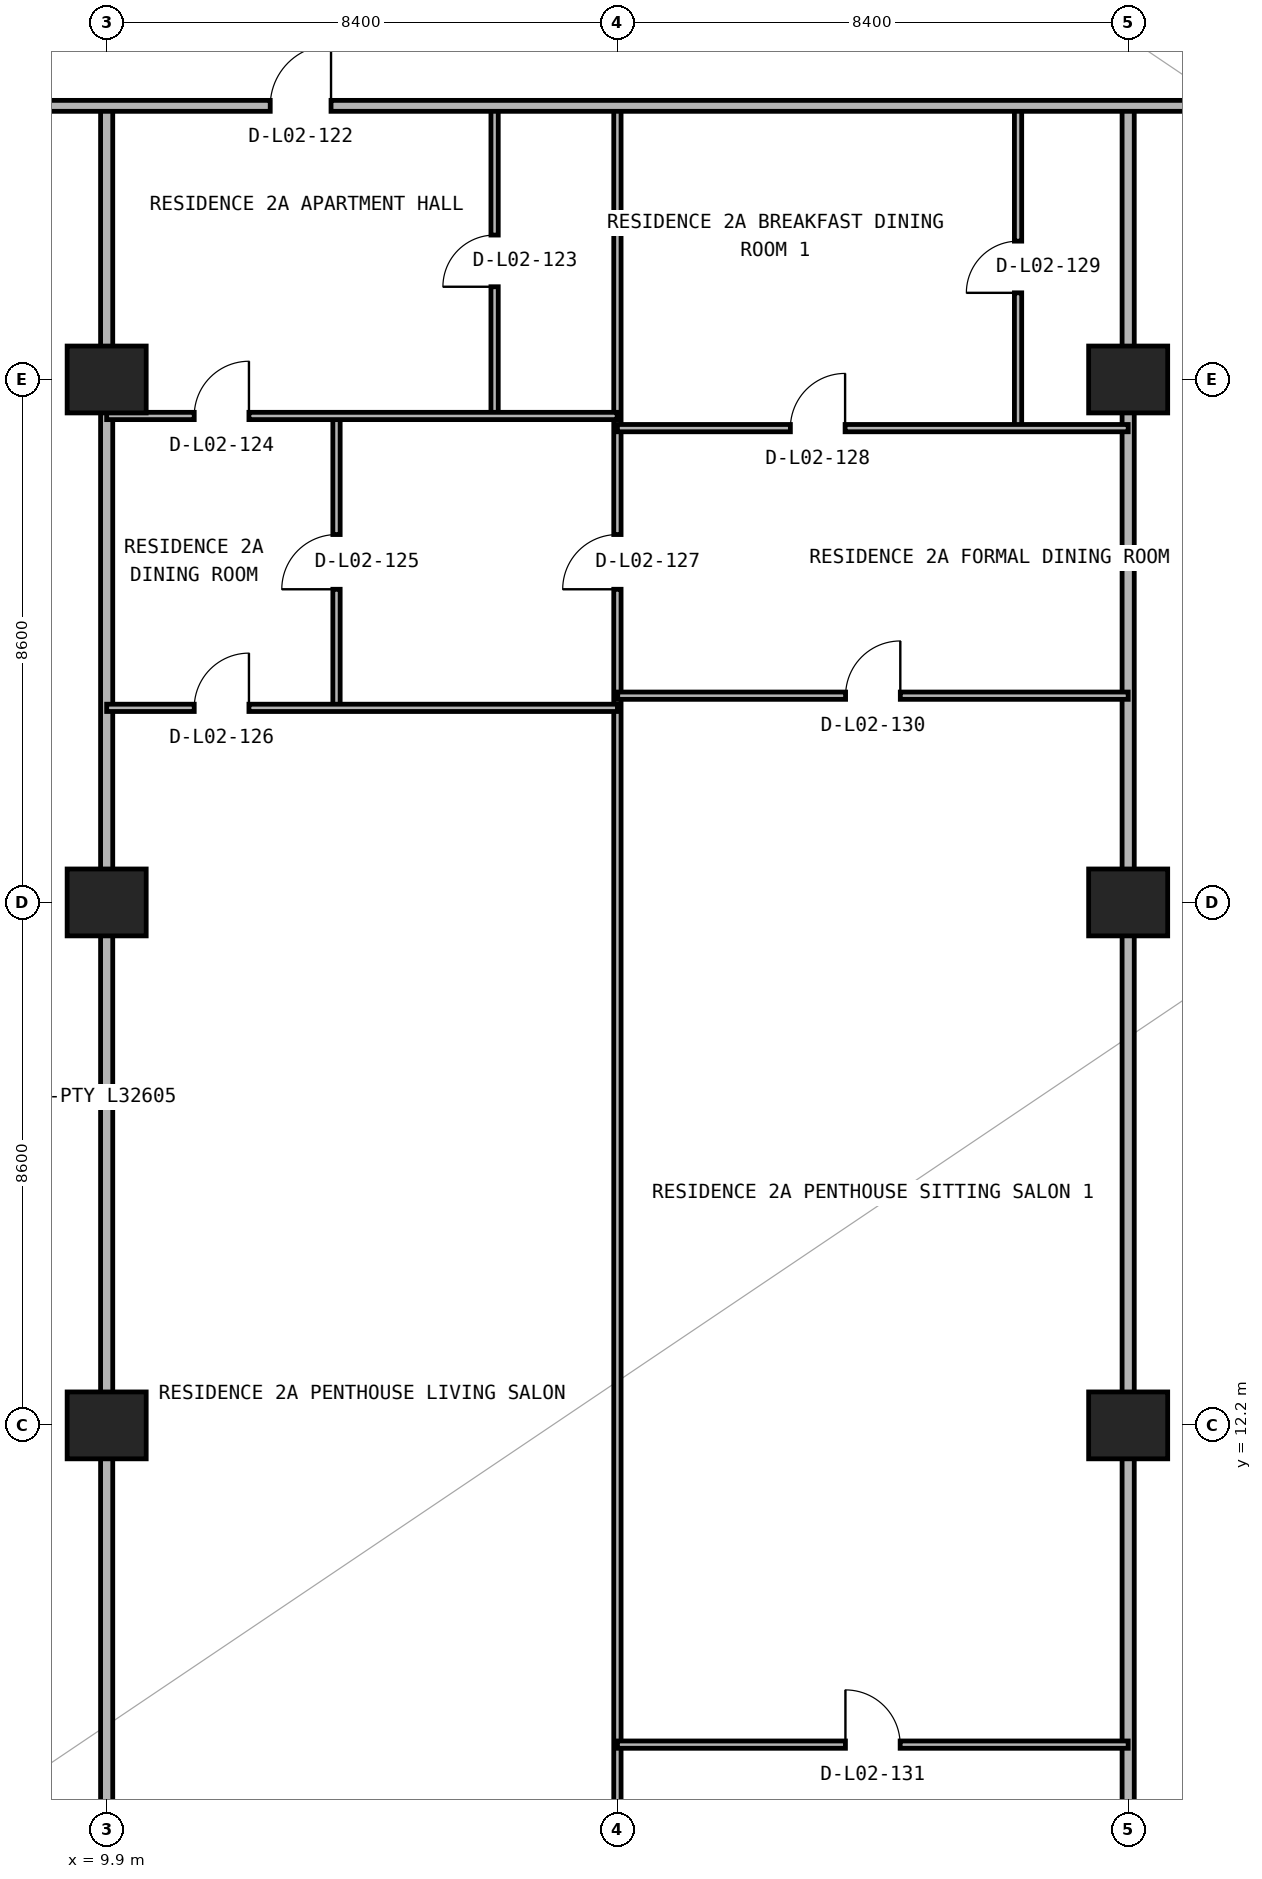
"""IFC4 building model, lengths in metres.
Left out: names, types, materials, properties, quantities, classifications, styles, units other than length and angle.
Written with IfcOpenShell. Run it as: python <this file> out.ifc"""

import sys

from ifc_helpers import new_model, si_unit, direction, frame, frame_2d, origin, origin_2d, place, context, subcontext, project, spatial, rectangle, extrude, element, fill, save


model = new_model("IFC4")
c1 = context("Model", 3, precision=1e-05, world=origin(), true_north=direction((0.0, 1.0)))
c2 = subcontext(c1, "Body", "Model", "MODEL_VIEW")
j1 = project(units=[si_unit("LENGTHUNIT", "METRE"), si_unit("PLANEANGLEUNIT", "RADIAN")], contexts=[c1])
p1 = place(None, origin())
s1 = spatial("IfcSite", under=j1, at=p1, CompositionType="ELEMENT")
p2 = place(p1, origin())
s2 = spatial("IfcBuilding", under=s1, at=p2, CompositionType="ELEMENT")
p3 = place(p2, frame((0.0, 0.0, 10.2)))
s3 = spatial("IfcBuildingStorey", under=s2, at=p3, CompositionType="ELEMENT", Elevation=10.2)
for number, where, z_axis, x_axis in (
    (1, (9.9, 12.2, 0.0), (0.0, 0.0, 1.0), (1.0, 0.0, 0.0)),
    (2, (26.7, 12.2, 0.0), (0.0, 0.0, 1.0), (1.0, 0.0, 0.0)),
    (3, (9.9, 20.8, 0.0), (0.0, 0.0, 1.0), (1.0, 0.0, 0.0)),
    (4, (26.7, 20.8, 0.0), (0.0, 0.0, 1.0), (1.0, 0.0, 0.0)),
    (5, (9.9, 29.4, 0.0), (0.0, 0.0, 1.0), (1.0, 0.0, 0.0)),
    (6, (26.7, 29.4, 0.0), (0.0, 0.0, 1.0), (1.0, 0.0, 0.0)),
):
    element("IfcColumn", number, at=place(p3, frame(where, z_axis=z_axis, x_axis=x_axis)), inside=s3, PredefinedType="COLUMN", context=c2, shape_type="SweptSolid", body=[
        extrude(rectangle(XDim=1.3, YDim=1.1, at=origin_2d()), origin(), (0.0, 0.0, 1.0), 4.5),
    ])
p4 = place(p3, frame((9.9, 1.295, 0.0), z_axis=(0.0, 0.0, 1.0), x_axis=(0.0, 1.0, 0.0)))
e7 = element("IfcWall", 7, at=p4, inside=s3, PredefinedType="PARTITIONING", context=c2, shape_type="SweptSolid", body=[
    extrude(rectangle(XDim=32.605, YDim=0.2, at=frame_2d((16.302, 0.0))), origin(), (0.0, 0.0, 1.0), 3.464),
])
p5 = place(p3, frame((13.68, 24.0, 0.0), z_axis=(0.0, 0.0, 1.0), x_axis=(0.0, 1.0, 0.0)))
e8 = element("IfcWall", 8, at=p5, inside=s3, PredefinedType="PARTITIONING", context=c2, shape_type="SweptSolid", body=[
    extrude(rectangle(XDim=4.8, YDim=0.12, at=frame_2d((2.4, 0.0))), origin(), (0.0, 0.0, 1.0), 4.5),
])
p6 = place(p5, frame((1.95, 0.0, 0.0)))
e9 = element("IfcOpeningElement", 9, at=p6, cuts=e8, PredefinedType="OPENING", context=c2, shape_type="SweptSolid", body=[
    extrude(rectangle(XDim=0.9, YDim=2.15, at=frame_2d((0.45, 1.075))), frame((0.0, 0.07, 0.0), z_axis=(0.0, -1.0, 0.0), x_axis=(1.0, 0.0, 0.0)), (0.0, 0.0, 1.0), 0.14),
])
p7 = place(p3, frame((16.28, 28.8, 0.0), z_axis=(0.0, 0.0, 1.0), x_axis=(0.0, 1.0, 0.0)))
e10 = element("IfcWall", 10, at=p7, inside=s3, PredefinedType="PARTITIONING", context=c2, shape_type="SweptSolid", body=[
    extrude(rectangle(XDim=5.1, YDim=0.12, at=frame_2d((2.55, 0.0))), origin(), (0.0, 0.0, 1.0), 4.5),
])
p8 = place(p7, frame((2.125, 0.0, 0.0)))
e11 = element("IfcOpeningElement", 11, at=p8, cuts=e10, PredefinedType="OPENING", context=c2, shape_type="SweptSolid", body=[
    extrude(rectangle(XDim=0.85, YDim=2.1, at=frame_2d((0.425, 1.05))), frame((0.0, 0.07, 0.0), z_axis=(0.0, -1.0, 0.0), x_axis=(1.0, 0.0, 0.0)), (0.0, 0.0, 1.0), 0.14),
])
p9 = place(p3, frame((18.3, 1.295, 0.0), z_axis=(0.0, 0.0, 1.0), x_axis=(0.0, 1.0, 0.0)))
e12 = element("IfcWall", 12, at=p9, inside=s3, PredefinedType="PARTITIONING", context=c2, shape_type="SweptSolid", body=[
    extrude(rectangle(XDim=32.605, YDim=0.12, at=frame_2d((16.302, 0.0))), origin(), (0.0, 0.0, 1.0), 4.5),
])
p10 = place(p9, frame((24.655, 0.0, 0.0)))
e13 = element("IfcOpeningElement", 13, at=p10, cuts=e12, PredefinedType="OPENING", context=c2, shape_type="SweptSolid", body=[
    extrude(rectangle(XDim=0.9, YDim=2.15, at=frame_2d((0.45, 1.075))), frame((0.0, 0.07, 0.0), z_axis=(0.0, -1.0, 0.0), x_axis=(1.0, 0.0, 0.0)), (0.0, 0.0, 1.0), 0.14),
])
p11 = place(p3, frame((24.889, 28.6, 0.0), z_axis=(0.0, 0.0, 1.0), x_axis=(0.0, 1.0, 0.0)))
e14 = element("IfcWall", 14, at=p11, inside=s3, PredefinedType="PARTITIONING", context=c2, shape_type="SweptSolid", body=[
    extrude(rectangle(XDim=5.3, YDim=0.12, at=frame_2d((2.65, 0.0))), origin(), (0.0, 0.0, 1.0), 4.5),
])
p12 = place(p11, frame((2.225, 0.0, 0.0)))
e15 = element("IfcOpeningElement", 15, at=p12, cuts=e14, PredefinedType="OPENING", context=c2, shape_type="SweptSolid", body=[
    extrude(rectangle(XDim=0.85, YDim=2.1, at=frame_2d((0.425, 1.05))), frame((0.0, 0.07, 0.0), z_axis=(0.0, -1.0, 0.0), x_axis=(1.0, 0.0, 0.0)), (0.0, 0.0, 1.0), 0.14),
])
p13 = place(p3, frame((26.7, 1.295, 0.0), z_axis=(0.0, 0.0, 1.0), x_axis=(0.0, 1.0, 0.0)))
e16 = element("IfcWall", 16, at=p13, inside=s3, PredefinedType="PARTITIONING", context=c2, shape_type="SweptSolid", body=[
    extrude(rectangle(XDim=32.605, YDim=0.2, at=frame_2d((16.302, 0.0))), origin(), (0.0, 0.0, 1.0), 3.464),
])
p14 = place(p3, frame((18.3, 6.95, 0.0), z_axis=(0.0, 0.0, 1.0), x_axis=(1.0, 0.0, 0.0)))
e17 = element("IfcWall", 17, at=p14, inside=s3, PredefinedType="PARTITIONING", context=c2, shape_type="SweptSolid", body=[
    extrude(rectangle(XDim=8.4, YDim=0.12, at=frame_2d((4.2, 0.0))), origin(), (0.0, 0.0, 1.0), 4.5),
])
p15 = place(p14, frame((3.75, 0.0, 0.0)))
e18 = element("IfcOpeningElement", 18, at=p15, cuts=e17, PredefinedType="OPENING", context=c2, shape_type="SweptSolid", body=[
    extrude(rectangle(XDim=0.9, YDim=2.15, at=frame_2d((0.45, 1.075))), frame((0.0, 0.07, 0.0), z_axis=(0.0, -1.0, 0.0), x_axis=(1.0, 0.0, 0.0)), (0.0, 0.0, 1.0), 0.14),
])
p16 = place(p3, frame((9.9, 24.0, 0.0), z_axis=(0.0, 0.0, 1.0), x_axis=(1.0, 0.0, 0.0)))
e19 = element("IfcWall", 19, at=p16, inside=s3, PredefinedType="PARTITIONING", context=c2, shape_type="SweptSolid", body=[
    extrude(rectangle(XDim=8.4, YDim=0.12, at=frame_2d((4.2, 0.0))), origin(), (0.0, 0.0, 1.0), 4.5),
])
p17 = place(p16, frame((1.44, 0.0, 0.0)))
e20 = element("IfcOpeningElement", 20, at=p17, cuts=e19, PredefinedType="OPENING", context=c2, shape_type="SweptSolid", body=[
    extrude(rectangle(XDim=0.9, YDim=2.15, at=frame_2d((0.45, 1.075))), frame((0.0, 0.07, 0.0), z_axis=(0.0, -1.0, 0.0), x_axis=(1.0, 0.0, 0.0)), (0.0, 0.0, 1.0), 0.14),
])
p18 = place(p3, frame((18.305, 24.2, 0.0), z_axis=(0.0, 0.0, 1.0), x_axis=(1.0, 0.0, 0.0)))
e21 = element("IfcWall", 21, at=p18, inside=s3, PredefinedType="PARTITIONING", context=c2, shape_type="SweptSolid", body=[
    extrude(rectangle(XDim=8.395, YDim=0.12, at=frame_2d((4.198, 0.0))), origin(), (0.0, 0.0, 1.0), 4.5),
])
p19 = place(p18, frame((3.748, 0.0, 0.0)))
e22 = element("IfcOpeningElement", 22, at=p19, cuts=e21, PredefinedType="OPENING", context=c2, shape_type="SweptSolid", body=[
    extrude(rectangle(XDim=0.9, YDim=2.15, at=frame_2d((0.45, 1.075))), frame((0.0, 0.07, 0.0), z_axis=(0.0, -1.0, 0.0), x_axis=(1.0, 0.0, 0.0)), (0.0, 0.0, 1.0), 0.14),
])
p20 = place(p3, frame((18.3, 28.6, 0.0), z_axis=(0.0, 0.0, 1.0), x_axis=(1.0, 0.0, 0.0)))
e23 = element("IfcWall", 23, at=p20, inside=s3, PredefinedType="PARTITIONING", context=c2, shape_type="SweptSolid", body=[
    extrude(rectangle(XDim=8.4, YDim=0.12, at=frame_2d((4.2, 0.0))), origin(), (0.0, 0.0, 1.0), 4.5),
])
p21 = place(p20, frame((2.844, 0.0, 0.0)))
e24 = element("IfcOpeningElement", 24, at=p21, cuts=e23, PredefinedType="OPENING", context=c2, shape_type="SweptSolid", body=[
    extrude(rectangle(XDim=0.9, YDim=2.15, at=frame_2d((0.45, 1.075))), frame((0.0, 0.07, 0.0), z_axis=(0.0, -1.0, 0.0), x_axis=(1.0, 0.0, 0.0)), (0.0, 0.0, 1.0), 0.14),
])
p22 = place(p3, frame((9.9, 28.8, 0.0), z_axis=(0.0, 0.0, 1.0), x_axis=(1.0, 0.0, 0.0)))
e25 = element("IfcWall", 25, at=p22, inside=s3, PredefinedType="PARTITIONING", context=c2, shape_type="SweptSolid", body=[
    extrude(rectangle(XDim=8.395, YDim=0.12, at=frame_2d((4.198, 0.0))), origin(), (0.0, 0.0, 1.0), 4.5),
])
p23 = place(p22, frame((1.44, 0.0, 0.0)))
e26 = element("IfcOpeningElement", 26, at=p23, cuts=e25, PredefinedType="OPENING", context=c2, shape_type="SweptSolid", body=[
    extrude(rectangle(XDim=0.9, YDim=2.15, at=frame_2d((0.45, 1.075))), frame((0.0, 0.07, 0.0), z_axis=(0.0, -1.0, 0.0), x_axis=(1.0, 0.0, 0.0)), (0.0, 0.0, 1.0), 0.14),
])
p24 = place(p3, frame((0.895, 33.9, 0.0), z_axis=(0.0, 0.0, 1.0), x_axis=(1.0, 0.0, 0.0)))
e27 = element("IfcWall", 27, at=p24, inside=s3, PredefinedType="PARTITIONING", context=c2, shape_type="SweptSolid", body=[
    extrude(rectangle(XDim=76.01, YDim=0.18, at=frame_2d((38.005, 0.0))), origin(), (0.0, 0.0, 1.0), 4.5),
])
p25 = place(p24, frame((3.978, 0.0, 0.0)))
e28 = element("IfcOpeningElement", 28, at=p25, cuts=e27, PredefinedType="OPENING", context=c2, shape_type="SweptSolid", body=[
    extrude(rectangle(XDim=1.05, YDim=2.15, at=frame_2d((0.525, 1.075))), frame((0.0, 0.1, 0.0), z_axis=(0.0, -1.0, 0.0), x_axis=(1.0, 0.0, 0.0)), (0.0, 0.0, 1.0), 0.2),
])
p26 = place(p24, frame((11.695, 0.0, 0.0)))
e29 = element("IfcOpeningElement", 29, at=p26, cuts=e27, PredefinedType="OPENING", context=c2, shape_type="SweptSolid", body=[
    extrude(rectangle(XDim=1.0, YDim=2.2, at=frame_2d((0.5, 1.1))), frame((0.0, 0.1, 0.0), z_axis=(0.0, -1.0, 0.0), x_axis=(1.0, 0.0, 0.0)), (0.0, 0.0, 1.0), 0.2),
])
p27 = place(p24, frame((37.48, 0.0, 0.0)))
e30 = element("IfcOpeningElement", 30, at=p27, cuts=e27, PredefinedType="OPENING", context=c2, shape_type="SweptSolid", body=[
    extrude(rectangle(XDim=1.05, YDim=2.15, at=frame_2d((0.525, 1.075))), frame((0.0, 0.1, 0.0), z_axis=(0.0, -1.0, 0.0), x_axis=(1.0, 0.0, 0.0)), (0.0, 0.0, 1.0), 0.2),
])
p28 = place(p24, frame((53.085, 0.0, 0.0)))
e31 = element("IfcOpeningElement", 31, at=p28, cuts=e27, PredefinedType="OPENING", context=c2, shape_type="SweptSolid", body=[
    extrude(rectangle(XDim=1.0, YDim=2.2, at=frame_2d((0.5, 1.1))), frame((0.0, 0.1, 0.0), z_axis=(0.0, -1.0, 0.0), x_axis=(1.0, 0.0, 0.0)), (0.0, 0.0, 1.0), 0.2),
])
p29 = place(p24, frame((70.982, 0.0, 0.0)))
e32 = element("IfcOpeningElement", 32, at=p29, cuts=e27, PredefinedType="OPENING", context=c2, shape_type="SweptSolid", body=[
    extrude(rectangle(XDim=1.05, YDim=2.15, at=frame_2d((0.525, 1.075))), frame((0.0, 0.1, 0.0), z_axis=(0.0, -1.0, 0.0), x_axis=(1.0, 0.0, 0.0)), (0.0, 0.0, 1.0), 0.2),
])
p30 = place(p26, origin())
e33 = element("IfcDoor", 33, at=p30, inside=s3, OperationType="SINGLE_SWING_RIGHT", PredefinedType="DOOR", context=c2, shape_type="SweptSolid", body=[
    extrude(rectangle(XDim=1.0, YDim=2.2, at=frame_2d((0.5, 1.1))), frame((0.0, 0.025, 0.0), z_axis=(0.0, -1.0, 0.0), x_axis=(1.0, 0.0, 0.0)), (0.0, 0.0, 1.0), 0.05),
])
fill(e29, e33)
p31 = place(p8, origin())
e34 = element("IfcDoor", 34, at=p31, inside=s3, OperationType="SINGLE_SWING_LEFT", PredefinedType="DOOR", context=c2, shape_type="SweptSolid", body=[
    extrude(rectangle(XDim=0.85, YDim=2.1, at=frame_2d((0.425, 1.05))), frame((0.0, 0.025, 0.0), z_axis=(0.0, -1.0, 0.0), x_axis=(1.0, 0.0, 0.0)), (0.0, 0.0, 1.0), 0.05),
])
fill(e11, e34)
p32 = place(p23, origin())
e35 = element("IfcDoor", 35, at=p32, inside=s3, OperationType="SINGLE_SWING_RIGHT", PredefinedType="DOOR", context=c2, shape_type="SweptSolid", body=[
    extrude(rectangle(XDim=0.9, YDim=2.15, at=frame_2d((0.45, 1.075))), frame((0.0, 0.025, 0.0), z_axis=(0.0, -1.0, 0.0), x_axis=(1.0, 0.0, 0.0)), (0.0, 0.0, 1.0), 0.05),
])
fill(e26, e35)
p33 = place(p6, origin())
e36 = element("IfcDoor", 36, at=p33, inside=s3, OperationType="SINGLE_SWING_LEFT", PredefinedType="DOOR", context=c2, shape_type="SweptSolid", body=[
    extrude(rectangle(XDim=0.9, YDim=2.15, at=frame_2d((0.45, 1.075))), frame((0.0, 0.025, 0.0), z_axis=(0.0, -1.0, 0.0), x_axis=(1.0, 0.0, 0.0)), (0.0, 0.0, 1.0), 0.05),
])
fill(e9, e36)
p34 = place(p17, origin())
e37 = element("IfcDoor", 37, at=p34, inside=s3, OperationType="SINGLE_SWING_RIGHT", PredefinedType="DOOR", context=c2, shape_type="SweptSolid", body=[
    extrude(rectangle(XDim=0.9, YDim=2.15, at=frame_2d((0.45, 1.075))), frame((0.0, 0.025, 0.0), z_axis=(0.0, -1.0, 0.0), x_axis=(1.0, 0.0, 0.0)), (0.0, 0.0, 1.0), 0.05),
])
fill(e20, e37)
p35 = place(p10, origin())
e38 = element("IfcDoor", 38, at=p35, inside=s3, OperationType="SINGLE_SWING_LEFT", PredefinedType="DOOR", context=c2, shape_type="SweptSolid", body=[
    extrude(rectangle(XDim=0.9, YDim=2.15, at=frame_2d((0.45, 1.075))), frame((0.0, 0.025, 0.0), z_axis=(0.0, -1.0, 0.0), x_axis=(1.0, 0.0, 0.0)), (0.0, 0.0, 1.0), 0.05),
])
fill(e13, e38)
p36 = place(p21, origin())
e39 = element("IfcDoor", 39, at=p36, inside=s3, OperationType="SINGLE_SWING_RIGHT", PredefinedType="DOOR", context=c2, shape_type="SweptSolid", body=[
    extrude(rectangle(XDim=0.9, YDim=2.15, at=frame_2d((0.45, 1.075))), frame((0.0, 0.025, 0.0), z_axis=(0.0, -1.0, 0.0), x_axis=(1.0, 0.0, 0.0)), (0.0, 0.0, 1.0), 0.05),
])
fill(e24, e39)
p37 = place(p12, origin())
e40 = element("IfcDoor", 40, at=p37, inside=s3, OperationType="SINGLE_SWING_LEFT", PredefinedType="DOOR", context=c2, shape_type="SweptSolid", body=[
    extrude(rectangle(XDim=0.85, YDim=2.1, at=frame_2d((0.425, 1.05))), frame((0.0, 0.025, 0.0), z_axis=(0.0, -1.0, 0.0), x_axis=(1.0, 0.0, 0.0)), (0.0, 0.0, 1.0), 0.05),
])
fill(e15, e40)
p38 = place(p19, origin())
e41 = element("IfcDoor", 41, at=p38, inside=s3, OperationType="SINGLE_SWING_RIGHT", PredefinedType="DOOR", context=c2, shape_type="SweptSolid", body=[
    extrude(rectangle(XDim=0.9, YDim=2.15, at=frame_2d((0.45, 1.075))), frame((0.0, 0.025, 0.0), z_axis=(0.0, -1.0, 0.0), x_axis=(1.0, 0.0, 0.0)), (0.0, 0.0, 1.0), 0.05),
])
fill(e22, e41)
p39 = place(p15, origin())
e42 = element("IfcDoor", 42, at=p39, inside=s3, OperationType="SINGLE_SWING_LEFT", PredefinedType="DOOR", context=c2, shape_type="SweptSolid", body=[
    extrude(rectangle(XDim=0.9, YDim=2.15, at=frame_2d((0.45, 1.075))), frame((0.0, 0.025, 0.0), z_axis=(0.0, -1.0, 0.0), x_axis=(1.0, 0.0, 0.0)), (0.0, 0.0, 1.0), 0.05),
])
fill(e18, e42)
save(model, sys.argv[1])
